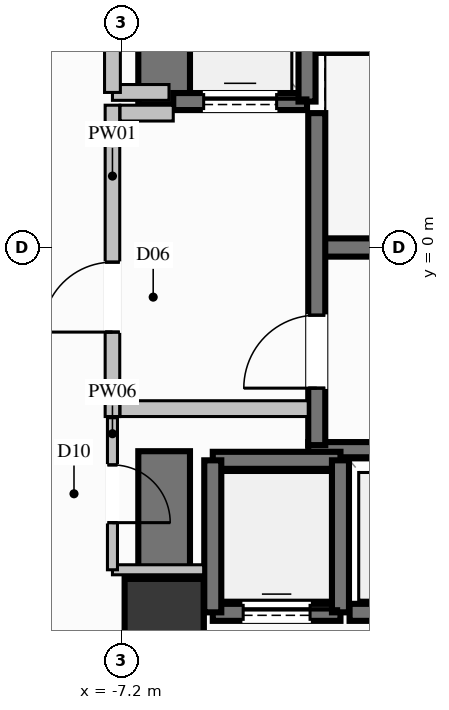
"""IFC4 building model, lengths in metres.
Left out: names, types, materials, properties, quantities, classifications, styles, units other than length and angle.
Written with IfcOpenShell. Run it as: python <this file> out.ifc"""

import sys

from ifc_helpers import new_model, si_unit, direction, frame, frame_2d, origin, origin_2d, place, context, subcontext, project, spatial, rectangle, extrude, element, fill, save


model = new_model("IFC4")
c1 = context("Model", 3, precision=1e-05, world=origin(), true_north=direction((0.0, 1.0)))
c2 = subcontext(c1, "Body", "Model", "MODEL_VIEW")
j1 = project(units=[si_unit("LENGTHUNIT", "METRE"), si_unit("PLANEANGLEUNIT", "RADIAN")], contexts=[c1])
p1 = place(None, origin())
s1 = spatial("IfcSite", under=j1, at=p1, CompositionType="ELEMENT")
p2 = place(p1, origin())
s2 = spatial("IfcBuilding", under=s1, at=p2, CompositionType="ELEMENT")
p3 = place(p2, frame((0.0, 0.0, 23.6)))
s3 = spatial("IfcBuildingStorey", under=s2, at=p3, CompositionType="ELEMENT", Elevation=23.6)
p4 = place(p3, frame((-6.5, -6.1, 0.0), z_axis=(0.0, 0.0, 1.0), x_axis=(1.0, 0.0, 0.0)))
e1 = element("IfcColumn", 1, at=p4, inside=s3, PredefinedType="COLUMN", context=c2, shape_type="SweptSolid", body=[
    extrude(rectangle(XDim=1.3, YDim=1.3, at=origin_2d()), origin(), (0.0, 0.0, 1.0), 4.8),
])
p5 = place(p3, frame((-3.99, 0.0, 0.0), z_axis=(0.0, 0.0, 1.0), x_axis=(1.0, 0.0, 0.0)))
e2 = element("IfcWall", 2, at=p5, inside=s3, PredefinedType="SHEAR", context=c2, shape_type="SweptSolid", body=[
    extrude(rectangle(XDim=7.98, YDim=0.3, at=frame_2d((3.99, 0.0))), origin(), (0.0, 0.0, 1.0), 4.8),
])
for number, where, z_axis, x_axis in (
    (3, (-4.13, -3.325, 0.0), (0.0, 0.0, 1.0), (1.0, 0.0, 0.0)),
    (4, (-4.13, 3.325, 0.0), (0.0, 0.0, 1.0), (1.0, 0.0, 0.0)),
):
    element("IfcWall", number, at=place(p3, frame(where, z_axis=z_axis, x_axis=x_axis)), inside=s3, PredefinedType="SOLIDWALL", context=c2, shape_type="SweptSolid", body=[
        extrude(rectangle(XDim=8.26, YDim=0.25, at=frame_2d((4.13, 0.0))), origin(), (0.0, 0.0, 1.0), 4.8),
    ])
p6 = place(p3, frame((-6.075, -6.1, 0.0), z_axis=(0.0, 0.0, 1.0), x_axis=(1.0, 0.0, 0.0)))
e5 = element("IfcWall", 5, at=p6, inside=s3, PredefinedType="SHEAR", context=c2, shape_type="SweptSolid", body=[
    extrude(rectangle(XDim=0.225, YDim=0.85, at=frame_2d((0.112, 0.0))), origin(), (0.0, 0.0, 1.0), 4.8),
])
p7 = place(p3, frame((-6.5, 2.35, 0.0), z_axis=(0.0, 0.0, 1.0), x_axis=(0.0, 1.0, 0.0)))
e6 = element("IfcWall", 6, at=p7, inside=s3, PredefinedType="SHEAR", context=c2, shape_type="SweptSolid", body=[
    extrude(rectangle(XDim=4.175, YDim=0.85, at=frame_2d((2.087, 0.0))), origin(), (0.0, 0.0, 1.0), 4.8),
])
p8 = place(p3, frame((-6.5, -6.525, 0.0), z_axis=(0.0, 0.0, 1.0), x_axis=(0.0, 1.0, 0.0)))
e7 = element("IfcWall", 7, at=p8, inside=s3, PredefinedType="SHEAR", context=c2, shape_type="SweptSolid", body=[
    extrude(rectangle(XDim=3.175, YDim=0.85, at=frame_2d((1.587, 0.0))), origin(), (0.0, 0.0, 1.0), 4.8),
])
p9 = place(p3, frame((-5.7, -6.0, 0.0), z_axis=(0.0, 0.0, 1.0), x_axis=(1.0, 0.0, 0.0)))
e8 = element("IfcWall", 8, at=p9, inside=s3, PredefinedType="SOLIDWALL", context=c2, shape_type="SweptSolid", body=[
    extrude(rectangle(XDim=2.1, YDim=0.28, at=frame_2d((1.05, 0.0))), origin(), (0.0, 0.0, 1.0), 4.54),
])
p10 = place(p9, frame((0.5, 0.0, 0.0)))
e9 = element("IfcOpeningElement", 9, at=p10, cuts=e8, PredefinedType="OPENING", context=c2, shape_type="SweptSolid", body=[
    extrude(rectangle(XDim=1.1, YDim=2.2, at=frame_2d((0.55, 1.1))), frame((0.0, 0.15, 0.0), z_axis=(0.0, -1.0, 0.0), x_axis=(1.0, 0.0, 0.0)), (0.0, 0.0, 1.0), 0.3),
])
p11 = place(p3, frame((-3.6, -3.5, 0.0), z_axis=(0.0, 0.0, 1.0), x_axis=(-1.0, 0.0, 0.0)))
e10 = element("IfcWall", 10, at=p11, inside=s3, PredefinedType="SOLIDWALL", context=c2, shape_type="SweptSolid", body=[
    extrude(rectangle(XDim=2.1, YDim=0.28, at=frame_2d((1.05, 0.0))), origin(), (0.0, 0.0, 1.0), 4.54),
])
for number, where, z_axis, x_axis in (
    (11, (-5.7, -3.5, 0.0), (0.0, 0.0, 1.0), (0.0, -1.0, 0.0)),
    (12, (-3.6, -6.0, 0.0), (0.0, 0.0, 1.0), (0.0, 1.0, 0.0)),
):
    element("IfcWall", number, at=place(p3, frame(where, z_axis=z_axis, x_axis=x_axis)), inside=s3, PredefinedType="SOLIDWALL", context=c2, shape_type="SweptSolid", body=[
        extrude(rectangle(XDim=2.5, YDim=0.28, at=frame_2d((1.25, 0.0))), origin(), (0.0, 0.0, 1.0), 4.54),
    ])
p12 = place(p3, frame((-3.45, -6.0, 0.0), z_axis=(0.0, 0.0, 1.0), x_axis=(1.0, 0.0, 0.0)))
e13 = element("IfcWall", 13, at=p12, inside=s3, PredefinedType="SOLIDWALL", context=c2, shape_type="SweptSolid", body=[
    extrude(rectangle(XDim=2.1, YDim=0.28, at=frame_2d((1.05, 0.0))), origin(), (0.0, 0.0, 1.0), 4.54),
])
p13 = place(p12, frame((0.5, 0.0, 0.0)))
e14 = element("IfcOpeningElement", 14, at=p13, cuts=e13, PredefinedType="OPENING", context=c2, shape_type="SweptSolid", body=[
    extrude(rectangle(XDim=1.1, YDim=2.2, at=frame_2d((0.55, 1.1))), frame((0.0, 0.15, 0.0), z_axis=(0.0, -1.0, 0.0), x_axis=(1.0, 0.0, 0.0)), (0.0, 0.0, 1.0), 0.3),
])
p14 = place(p3, frame((-6.35, 2.4, 0.0), z_axis=(0.0, 0.0, 1.0), x_axis=(1.0, 0.0, 0.0)))
e15 = element("IfcWall", 15, at=p14, inside=s3, PredefinedType="SOLIDWALL", context=c2, shape_type="SweptSolid", body=[
    extrude(rectangle(XDim=2.2, YDim=0.28, at=frame_2d((1.1, 0.0))), origin(), (0.0, 0.0, 1.0), 4.54),
])
p15 = place(p14, frame((0.5, 0.0, 0.0)))
e16 = element("IfcOpeningElement", 16, at=p15, cuts=e15, PredefinedType="OPENING", context=c2, shape_type="SweptSolid", body=[
    extrude(rectangle(XDim=1.2, YDim=2.2, at=frame_2d((0.6, 1.1))), frame((0.0, 0.15, 0.0), z_axis=(0.0, -1.0, 0.0), x_axis=(1.0, 0.0, 0.0)), (0.0, 0.0, 1.0), 0.3),
])
p16 = place(p3, frame((-4.15, 2.4, 0.0), z_axis=(0.0, 0.0, 1.0), x_axis=(0.0, 1.0, 0.0)))
e17 = element("IfcWall", 17, at=p16, inside=s3, PredefinedType="SOLIDWALL", context=c2, shape_type="SweptSolid", body=[
    extrude(rectangle(XDim=2.7, YDim=0.28, at=frame_2d((1.35, 0.0))), origin(), (0.0, 0.0, 1.0), 4.54),
])
p17 = place(p3, frame((-3.99, -3.25, 0.0), z_axis=(0.0, 0.0, 1.0), x_axis=(0.0, 1.0, 0.0)))
e18 = element("IfcWall", 18, at=p17, inside=s3, PredefinedType="SOLIDWALL", context=c2, shape_type="SweptSolid", body=[
    extrude(rectangle(XDim=5.46, YDim=0.28, at=frame_2d((2.73, 0.0))), origin(), (0.0, 0.0, 1.0), 4.54),
])
p18 = place(p17, frame((0.937, 0.0, 0.0)))
e19 = element("IfcOpeningElement", 19, at=p18, cuts=e18, PredefinedType="OPENING", context=c2, shape_type="SweptSolid", body=[
    extrude(rectangle(XDim=1.2, YDim=2.2, at=frame_2d((0.6, 1.1))), frame((0.0, 0.15, 0.0), z_axis=(0.0, -1.0, 0.0), x_axis=(1.0, 0.0, 0.0)), (0.0, 0.0, 1.0), 0.3),
])
p19 = place(p3, frame((-7.35, -2.78, 0.0), z_axis=(0.0, 0.0, 1.0), x_axis=(0.0, 1.0, 0.0)))
e20 = element("IfcWall", 20, at=p19, inside=s3, PredefinedType="PARTITIONING", context=c2, shape_type="SweptSolid", body=[
    extrude(rectangle(XDim=5.12, YDim=0.24, at=frame_2d((2.56, 0.0))), origin(), (0.0, 0.0, 1.0), 2.725),
])
p20 = place(p19, frame((1.389, 0.0, 0.0)))
e21 = element("IfcOpeningElement", 21, at=p20, cuts=e20, PredefinedType="OPENING", context=c2, shape_type="SweptSolid", body=[
    extrude(rectangle(XDim=1.15, YDim=2.2, at=frame_2d((0.575, 1.1))), frame((0.0, 0.13, 0.0), z_axis=(0.0, -1.0, 0.0), x_axis=(1.0, 0.0, 0.0)), (0.0, 0.0, 1.0), 0.26),
])
p21 = place(p3, frame((-7.225, -2.65, 0.0), z_axis=(0.0, 0.0, 1.0), x_axis=(1.0, 0.0, 0.0)))
e22 = element("IfcWall", 22, at=p21, inside=s3, PredefinedType="PARTITIONING", context=c2, shape_type="SweptSolid", body=[
    extrude(rectangle(XDim=3.095, YDim=0.26, at=frame_2d((1.548, 0.0))), origin(), (0.0, 0.0, 1.0), 4.54),
])
p22 = place(p3, frame((-7.225, 2.21, 0.0), z_axis=(0.0, 0.0, 1.0), x_axis=(1.0, 0.0, 0.0)))
e23 = element("IfcWall", 23, at=p22, inside=s3, PredefinedType="PARTITIONING", context=c2, shape_type="SweptSolid", body=[
    extrude(rectangle(XDim=0.875, YDim=0.26, at=frame_2d((0.438, 0.0))), origin(), (0.0, 0.0, 1.0), 4.54),
])
p23 = place(p3, frame((-7.35, 2.55, 0.0), z_axis=(0.0, 0.0, 1.0), x_axis=(1.0, 0.0, 0.0)))
e24 = element("IfcWall", 24, at=p23, inside=s3, PredefinedType="PARTITIONING", context=c2, shape_type="SweptSolid", body=[
    extrude(rectangle(XDim=0.93, YDim=0.26, at=frame_2d((0.465, 0.0))), origin(), (0.0, 0.0, 1.0), 4.54),
])
p24 = place(p3, frame((-7.35, 2.55, 0.0), z_axis=(0.0, 0.0, 1.0), x_axis=(0.0, 1.0, 0.0)))
e25 = element("IfcWall", 25, at=p24, inside=s3, PredefinedType="PARTITIONING", context=c2, shape_type="SweptSolid", body=[
    extrude(rectangle(XDim=2.4, YDim=0.26, at=frame_2d((1.2, 0.0))), origin(), (0.0, 0.0, 1.0), 2.725),
])
p25 = place(p24, frame((0.775, 0.0, 0.0)))
e26 = element("IfcOpeningElement", 26, at=p25, cuts=e25, PredefinedType="OPENING", context=c2, shape_type="SweptSolid", body=[
    extrude(rectangle(XDim=0.85, YDim=2.05, at=frame_2d((0.425, 1.025))), frame((0.0, 0.14, 0.0), z_axis=(0.0, -1.0, 0.0), x_axis=(1.0, 0.0, 0.0)), (0.0, 0.0, 1.0), 0.28),
])
p26 = place(p3, frame((-7.35, -5.3, 0.0), z_axis=(0.0, 0.0, 1.0), x_axis=(1.0, 0.0, 0.0)))
e27 = element("IfcWall", 27, at=p26, inside=s3, PredefinedType="PARTITIONING", context=c2, shape_type="SweptSolid", body=[
    extrude(rectangle(XDim=1.5, YDim=0.165, at=frame_2d((0.75, 0.0))), origin(), (0.0, 0.0, 1.0), 2.725),
])
p27 = place(p3, frame((-7.35, -2.8, 0.0), z_axis=(0.0, 0.0, 1.0), x_axis=(0.0, -1.0, 0.0)))
e28 = element("IfcWall", 28, at=p27, inside=s3, PredefinedType="PARTITIONING", context=c2, shape_type="SweptSolid", body=[
    extrude(rectangle(XDim=2.5, YDim=0.165, at=frame_2d((1.25, 0.0))), origin(), (0.0, 0.0, 1.0), 2.725),
])
p28 = place(p27, frame((0.775, 0.0, 0.0)))
e29 = element("IfcOpeningElement", 29, at=p28, cuts=e28, PredefinedType="OPENING", context=c2, shape_type="SweptSolid", body=[
    extrude(rectangle(XDim=0.95, YDim=2.1, at=frame_2d((0.475, 1.05))), frame((0.0, 0.093, 0.0), z_axis=(0.0, -1.0, 0.0), x_axis=(1.0, 0.0, 0.0)), (0.0, 0.0, 1.0), 0.185),
])
p29 = place(p10, origin())
e30 = element("IfcDoor", 30, at=p29, inside=s3, OperationType="SLIDING_TO_LEFT", PredefinedType="DOOR", context=c2, shape_type="SweptSolid", body=[
    extrude(rectangle(XDim=1.1, YDim=2.2, at=frame_2d((0.55, 1.1))), frame((0.0, 0.025, 0.0), z_axis=(0.0, -1.0, 0.0), x_axis=(1.0, 0.0, 0.0)), (0.0, 0.0, 1.0), 0.05),
])
fill(e9, e30)
p30 = place(p15, origin())
e31 = element("IfcDoor", 31, at=p30, inside=s3, OperationType="SLIDING_TO_LEFT", PredefinedType="DOOR", context=c2, shape_type="SweptSolid", body=[
    extrude(rectangle(XDim=1.2, YDim=2.2, at=frame_2d((0.6, 1.1))), frame((0.0, 0.025, 0.0), z_axis=(0.0, -1.0, 0.0), x_axis=(1.0, 0.0, 0.0)), (0.0, 0.0, 1.0), 0.05),
])
fill(e16, e31)
p31 = place(p18, origin())
e32 = element("IfcDoor", 32, at=p31, inside=s3, OperationType="SINGLE_SWING_LEFT", PredefinedType="DOOR", context=c2, shape_type="SweptSolid", body=[
    extrude(rectangle(XDim=1.2, YDim=2.2, at=frame_2d((0.6, 1.1))), frame((0.0, 0.025, 0.0), z_axis=(0.0, -1.0, 0.0), x_axis=(1.0, 0.0, 0.0)), (0.0, 0.0, 1.0), 0.05),
])
fill(e19, e32)
p32 = place(p20, origin())
e33 = element("IfcDoor", 33, at=p32, inside=s3, OperationType="SINGLE_SWING_LEFT", PredefinedType="DOOR", context=c2, shape_type="SweptSolid", body=[
    extrude(rectangle(XDim=1.15, YDim=2.2, at=frame_2d((0.575, 1.1))), frame((0.0, 0.025, 0.0), z_axis=(0.0, -1.0, 0.0), x_axis=(1.0, 0.0, 0.0)), (0.0, 0.0, 1.0), 0.05),
])
fill(e21, e33)
p33 = place(p28, origin())
e34 = element("IfcDoor", 34, at=p33, inside=s3, OperationType="SINGLE_SWING_RIGHT", PredefinedType="DOOR", context=c2, shape_type="SweptSolid", body=[
    extrude(rectangle(XDim=0.95, YDim=2.1, at=frame_2d((0.475, 1.05))), frame((0.0, 0.025, 0.0), z_axis=(0.0, -1.0, 0.0), x_axis=(1.0, 0.0, 0.0)), (0.0, 0.0, 1.0), 0.05),
])
fill(e29, e34)
save(model, sys.argv[1])
